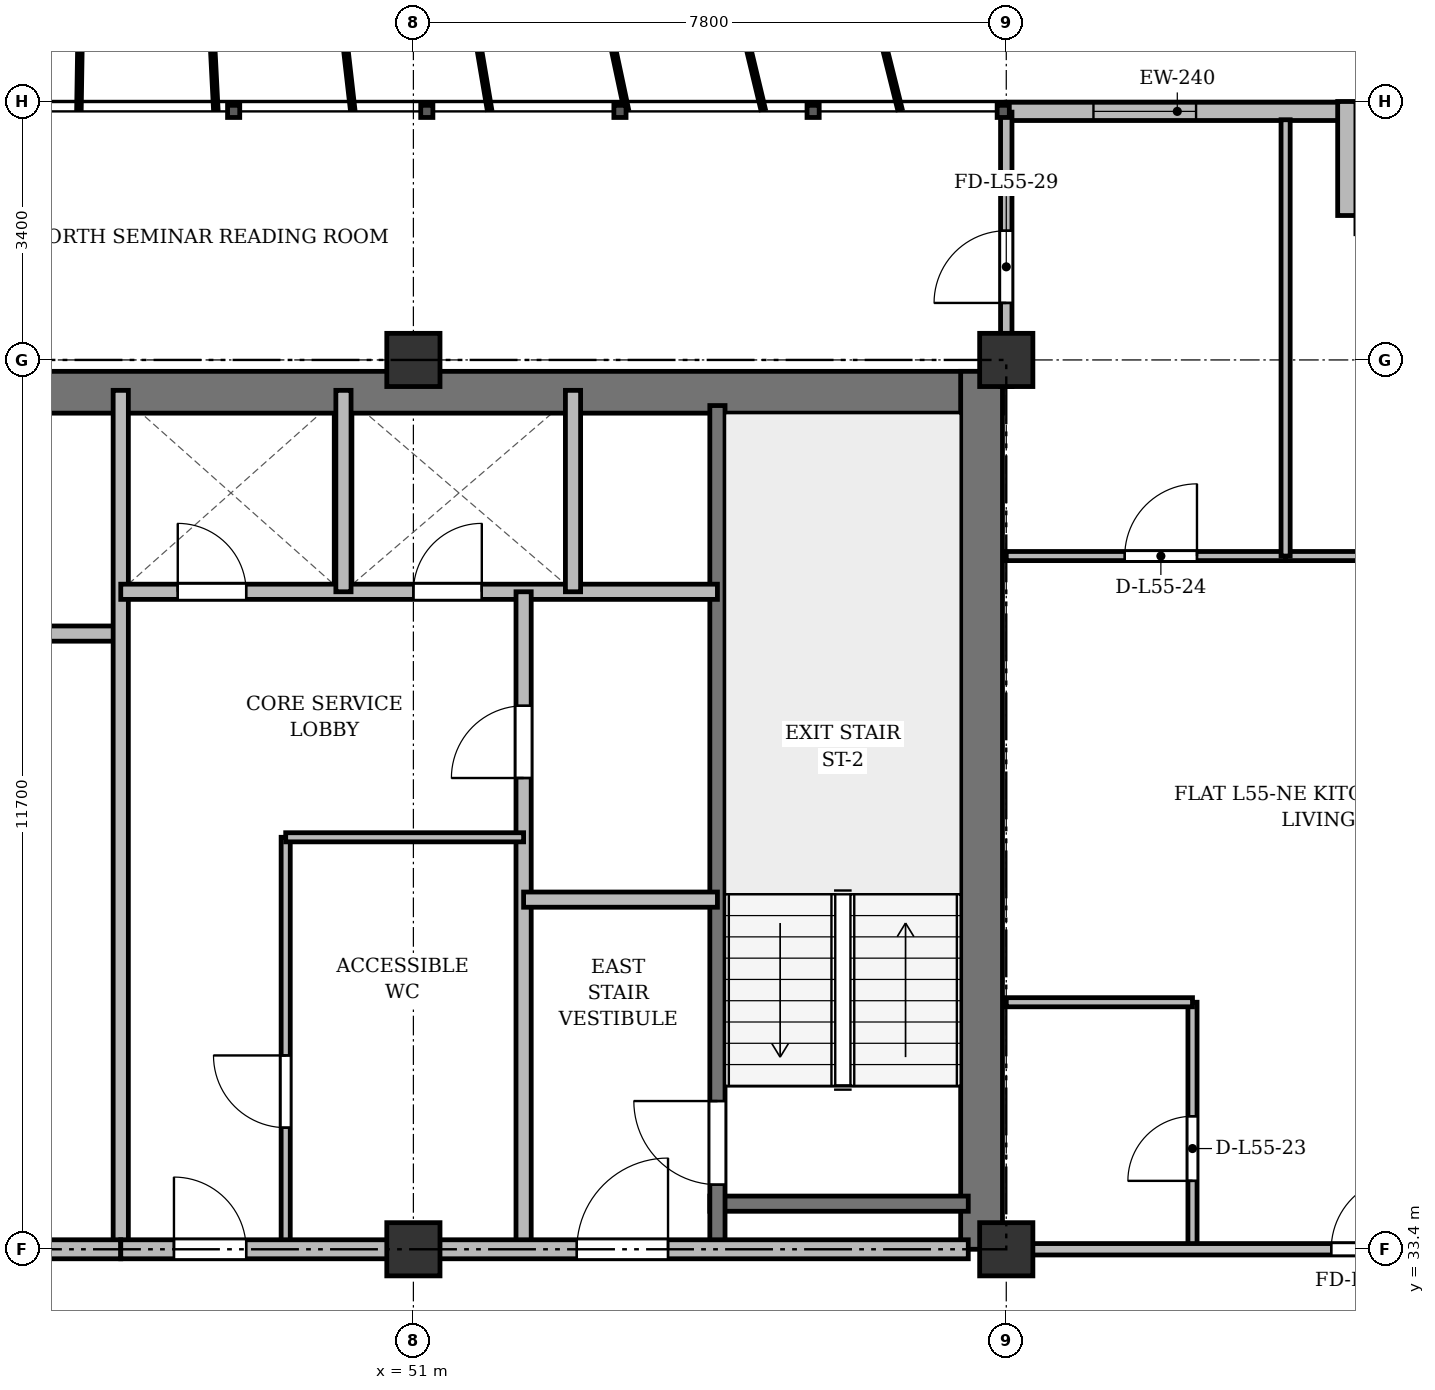
"""IFC4 building model, lengths in metres.
Left out: names, types, materials, properties, quantities, classifications, styles, units other than length and angle.
Written with IfcOpenShell. Run it as: python <this file> out.ifc"""

import sys

from ifc_helpers import new_model, si_unit, direction, frame, frame_2d, origin, origin_2d, place, context, subcontext, project, spatial, rectangle, extrude, source, transform, mapped, element, fill, save


model = new_model("IFC4")
c1 = context("Model", 3, precision=1e-05, world=origin(), true_north=direction((0.0, 1.0)))
c2 = subcontext(c1, "Body", "Model", "MODEL_VIEW")
j1 = project(units=[si_unit("LENGTHUNIT", "METRE"), si_unit("PLANEANGLEUNIT", "RADIAN")], contexts=[c1])
p1 = place(None, origin())
s1 = spatial("IfcSite", under=j1, at=p1, CompositionType="ELEMENT")
p2 = place(p1, origin())
s2 = spatial("IfcBuilding", under=s1, at=p2, CompositionType="ELEMENT")
p3 = place(p2, frame((0.0, 0.0, 212.1)))
s3 = spatial("IfcBuildingStorey", under=s2, at=p3, CompositionType="ELEMENT", Elevation=212.1)
m1 = source(origin(), c2, "Body", "SweptSolid", [
    extrude(rectangle(XDim=0.7, YDim=0.7, at=origin_2d()), origin(), (0.0, 0.0, 1.0), 3.6),
])
for number, where, z_axis, x_axis in (
    (1, (51.0, 33.4, 0.0), (0.0, 0.0, 1.0), (1.0, 0.0, 0.0)),
    (2, (51.0, 45.1, 0.0), (0.0, 0.0, 1.0), (1.0, 0.0, 0.0)),
    (3, (58.8, 33.4, 0.0), (0.0, 0.0, 1.0), (1.0, 0.0, 0.0)),
    (4, (58.8, 45.1, 0.0), (0.0, 0.0, 1.0), (1.0, 0.0, 0.0)),
):
    element("IfcColumn", number, at=place(p3, frame(where, z_axis=z_axis, x_axis=x_axis)), inside=s3, PredefinedType="COLUMN", context=c2, shape_type="MappedRepresentation", body=[
        mapped(m1, transform((0.0, 0.0, 0.0), x_axis=(1.0, 0.0, 0.0), y_axis=(0.0, 1.0, 0.0), z_axis=(0.0, 0.0, 1.0), scale=1.0)),
    ])
p4 = place(p3, frame((58.8, 48.37, 0.0), z_axis=(0.0, 0.0, 1.0), x_axis=(1.0, 0.0, 0.0)))
e5 = element("IfcWall", 5, at=p4, inside=s3, PredefinedType="SOLIDWALL", context=c2, shape_type="SweptSolid", body=[
    extrude(rectangle(XDim=4.5, YDim=0.24, at=frame_2d((2.25, 0.0))), origin(), (0.0, 0.0, 1.0), 3.36),
])
p5 = place(p4, frame((1.147, 0.0, 0.9)))
e6 = element("IfcOpeningElement", 6, at=p5, cuts=e5, PredefinedType="OPENING", context=c2, shape_type="SweptSolid", body=[
    extrude(rectangle(XDim=1.35, YDim=1.5, at=frame_2d((0.675, 0.75))), frame((0.0, 0.13, 0.0), z_axis=(0.0, -1.0, 0.0), x_axis=(1.0, 0.0, 0.0)), (0.0, 0.0, 1.0), 0.26),
])
p6 = place(p3, frame((63.28, 48.5, 0.0), z_axis=(0.0, 0.0, 1.0), x_axis=(0.0, -1.0, 0.0)))
e7 = element("IfcWall", 7, at=p6, inside=s3, PredefinedType="SOLIDWALL", context=c2, shape_type="SweptSolid", body=[
    extrude(rectangle(XDim=1.5, YDim=0.24, at=frame_2d((0.75, 0.0))), origin(), (0.0, 0.0, 1.0), 3.36),
])
p7 = place(p3, frame((15.65, 44.675, 0.0), z_axis=(0.0, 0.0, 1.0), x_axis=(1.0, 0.0, 0.0)))
e8 = element("IfcWall", 8, at=p7, inside=s3, PredefinedType="SHEAR", context=c2, shape_type="SweptSolid", body=[
    extrude(rectangle(XDim=43.1, YDim=0.55, at=frame_2d((21.55, 0.0))), origin(), (0.0, 0.0, 1.0), 3.36),
])
p8 = place(p3, frame((58.475, 33.4, 0.0), z_axis=(0.0, 0.0, 1.0), x_axis=(0.0, 1.0, 0.0)))
e9 = element("IfcWall", 9, at=p8, inside=s3, PredefinedType="SHEAR", context=c2, shape_type="SweptSolid", body=[
    extrude(rectangle(XDim=11.55, YDim=0.55, at=frame_2d((5.775, 0.0))), origin(), (0.0, 0.0, 1.0), 3.36),
])
p9 = place(p3, frame((54.9, 34.0, 0.0), z_axis=(0.0, 0.0, 1.0), x_axis=(1.0, 0.0, 0.0)))
e10 = element("IfcWall", 10, at=p9, inside=s3, PredefinedType="SHEAR", context=c2, shape_type="SweptSolid", body=[
    extrude(rectangle(XDim=3.4, YDim=0.2, at=frame_2d((1.7, 0.0))), origin(), (0.0, 0.0, 1.0), 3.36),
])
p10 = place(p3, frame((55.0, 33.4, 0.0), z_axis=(0.0, 0.0, 1.0), x_axis=(0.0, 1.0, 0.0)))
e11 = element("IfcWall", 11, at=p10, inside=s3, PredefinedType="SHEAR", context=c2, shape_type="SweptSolid", body=[
    extrude(rectangle(XDim=11.1, YDim=0.2, at=frame_2d((5.55, 0.0))), origin(), (0.0, 0.0, 1.0), 3.36),
])
p11 = place(p10, frame((0.85, 0.0, 0.0)))
e12 = element("IfcOpeningElement", 12, at=p11, cuts=e11, PredefinedType="OPENING", context=c2, shape_type="SweptSolid", body=[
    extrude(rectangle(XDim=1.1, YDim=2.15, at=frame_2d((0.55, 1.075))), frame((0.0, 0.11, 0.0), z_axis=(0.0, -1.0, 0.0), x_axis=(1.0, 0.0, 0.0)), (0.0, 0.0, 1.0), 0.22),
])
p12 = place(p3, frame((40.25, 41.5, 0.0), z_axis=(0.0, 0.0, 1.0), x_axis=(1.0, 0.0, 0.0)))
e13 = element("IfcWall", 13, at=p12, inside=s3, PredefinedType="SOLIDWALL", context=c2, shape_type="SweptSolid", body=[
    extrude(rectangle(XDim=6.9, YDim=0.2, at=frame_2d((3.45, 0.0))), origin(), (0.0, 0.0, 1.0), 3.36),
])
p13 = place(p3, frame((47.15, 33.4, 0.0), z_axis=(0.0, 0.0, 1.0), x_axis=(0.0, 1.0, 0.0)))
e14 = element("IfcWall", 14, at=p13, inside=s3, PredefinedType="SOLIDWALL", context=c2, shape_type="SweptSolid", body=[
    extrude(rectangle(XDim=11.3, YDim=0.2, at=frame_2d((5.65, 0.0))), origin(), (0.0, 0.0, 1.0), 2.91),
])
p14 = place(p3, frame((33.3, 33.4, 0.0), z_axis=(0.0, 0.0, 1.0), x_axis=(1.0, 0.0, 0.0)))
e15 = element("IfcWall", 15, at=p14, inside=s3, PredefinedType="PARTITIONING", context=c2, shape_type="SweptSolid", body=[
    extrude(rectangle(XDim=13.85, YDim=0.25, at=frame_2d((6.925, 0.0))), origin(), (0.0, 0.0, 1.0), 2.91),
])
p15 = place(p14, frame((4.2, 0.0, 0.0)))
e16 = element("IfcOpeningElement", 16, at=p15, cuts=e15, PredefinedType="OPENING", context=c2, shape_type="SweptSolid", body=[
    extrude(rectangle(XDim=1.6, YDim=2.2, at=frame_2d((0.8, 1.1))), frame((0.0, 0.135, 0.0), z_axis=(0.0, -1.0, 0.0), x_axis=(1.0, 0.0, 0.0)), (0.0, 0.0, 1.0), 0.27),
])
p16 = place(p3, frame((47.15, 42.05, 0.0), z_axis=(0.0, 0.0, 1.0), x_axis=(1.0, 0.0, 0.0)))
e17 = element("IfcWall", 17, at=p16, inside=s3, PredefinedType="SOLIDWALL", context=c2, shape_type="SweptSolid", body=[
    extrude(rectangle(XDim=7.85, YDim=0.2, at=frame_2d((3.925, 0.0))), origin(), (0.0, 0.0, 1.0), 2.86),
])
p17 = place(p16, frame((0.75, 0.0, 0.0)))
e18 = element("IfcOpeningElement", 18, at=p17, cuts=e17, PredefinedType="OPENING", context=c2, shape_type="SweptSolid", body=[
    extrude(rectangle(XDim=0.9, YDim=2.1, at=frame_2d((0.45, 1.05))), frame((0.0, 0.11, 0.0), z_axis=(0.0, -1.0, 0.0), x_axis=(1.0, 0.0, 0.0)), (0.0, 0.0, 1.0), 0.22),
])
p18 = place(p16, frame((3.85, 0.0, 0.0)))
e19 = element("IfcOpeningElement", 19, at=p18, cuts=e17, PredefinedType="OPENING", context=c2, shape_type="SweptSolid", body=[
    extrude(rectangle(XDim=0.9, YDim=2.1, at=frame_2d((0.45, 1.05))), frame((0.0, 0.11, 0.0), z_axis=(0.0, -1.0, 0.0), x_axis=(1.0, 0.0, 0.0)), (0.0, 0.0, 1.0), 0.22),
])
for number, where, z_axis, x_axis in (
    (20, (50.08, 42.05, 0.0), (0.0, 0.0, 1.0), (0.0, 1.0, 0.0)),
    (21, (53.1, 42.05, 0.0), (0.0, 0.0, 1.0), (0.0, 1.0, 0.0)),
):
    element("IfcWall", number, at=place(p3, frame(where, z_axis=z_axis, x_axis=x_axis)), inside=s3, PredefinedType="SOLIDWALL", context=c2, shape_type="SweptSolid", body=[
        extrude(rectangle(XDim=2.65, YDim=0.2, at=frame_2d((1.325, 0.0))), origin(), (0.0, 0.0, 1.0), 3.36),
    ])
p19 = place(p3, frame((52.45, 33.4, 0.0), z_axis=(0.0, 0.0, 1.0), x_axis=(0.0, 1.0, 0.0)))
e22 = element("IfcWall", 22, at=p19, inside=s3, PredefinedType="PARTITIONING", context=c2, shape_type="SweptSolid", body=[
    extrude(rectangle(XDim=8.65, YDim=0.2, at=frame_2d((4.325, 0.0))), origin(), (0.0, 0.0, 1.0), 2.91),
])
p20 = place(p19, frame((6.2, 0.0, 0.0)))
e23 = element("IfcOpeningElement", 23, at=p20, cuts=e22, PredefinedType="OPENING", context=c2, shape_type="SweptSolid", body=[
    extrude(rectangle(XDim=0.95, YDim=2.15, at=frame_2d((0.475, 1.075))), frame((0.0, 0.11, 0.0), z_axis=(0.0, -1.0, 0.0), x_axis=(1.0, 0.0, 0.0)), (0.0, 0.0, 1.0), 0.22),
])
p21 = place(p3, frame((52.45, 38.0, 0.0), z_axis=(0.0, 0.0, 1.0), x_axis=(1.0, 0.0, 0.0)))
e24 = element("IfcWall", 24, at=p21, inside=s3, PredefinedType="PARTITIONING", context=c2, shape_type="SweptSolid", body=[
    extrude(rectangle(XDim=2.55, YDim=0.2, at=frame_2d((1.275, 0.0))), origin(), (0.0, 0.0, 1.0), 3.36),
])
p22 = place(p3, frame((49.32, 33.4, 0.0), z_axis=(0.0, 0.0, 1.0), x_axis=(0.0, 1.0, 0.0)))
e25 = element("IfcWall", 25, at=p22, inside=s3, PredefinedType="PARTITIONING", context=c2, shape_type="SweptSolid", body=[
    extrude(rectangle(XDim=5.42, YDim=0.12, at=frame_2d((2.71, 0.0))), origin(), (0.0, 0.0, 1.0), 2.91),
])
p23 = place(p22, frame((1.6, 0.0, 0.0)))
e26 = element("IfcOpeningElement", 26, at=p23, cuts=e25, PredefinedType="OPENING", context=c2, shape_type="SweptSolid", body=[
    extrude(rectangle(XDim=0.95, YDim=2.15, at=frame_2d((0.475, 1.075))), frame((0.0, 0.07, 0.0), z_axis=(0.0, -1.0, 0.0), x_axis=(1.0, 0.0, 0.0)), (0.0, 0.0, 1.0), 0.14),
])
p24 = place(p3, frame((49.32, 38.82, 0.0), z_axis=(0.0, 0.0, 1.0), x_axis=(1.0, 0.0, 0.0)))
e27 = element("IfcWall", 27, at=p24, inside=s3, PredefinedType="PARTITIONING", context=c2, shape_type="SweptSolid", body=[
    extrude(rectangle(XDim=3.13, YDim=0.12, at=frame_2d((1.565, 0.0))), origin(), (0.0, 0.0, 1.0), 2.86),
])
p25 = place(p3, frame((47.15, 33.4, 0.0), z_axis=(0.0, 0.0, 1.0), x_axis=(1.0, 0.0, 0.0)))
e28 = element("IfcWall", 28, at=p25, inside=s3, PredefinedType="PARTITIONING", context=c2, shape_type="SweptSolid", body=[
    extrude(rectangle(XDim=11.15, YDim=0.25, at=frame_2d((5.575, 0.0))), origin(), (0.0, 0.0, 1.0), 2.91),
])
p26 = place(p25, frame((0.7, 0.0, 0.0)))
e29 = element("IfcOpeningElement", 29, at=p26, cuts=e28, PredefinedType="OPENING", context=c2, shape_type="SweptSolid", body=[
    extrude(rectangle(XDim=0.95, YDim=2.15, at=frame_2d((0.475, 1.075))), frame((0.0, 0.135, 0.0), z_axis=(0.0, -1.0, 0.0), x_axis=(1.0, 0.0, 0.0)), (0.0, 0.0, 1.0), 0.27),
])
p27 = place(p25, frame((6.0, 0.0, 0.0)))
e30 = element("IfcOpeningElement", 30, at=p27, cuts=e28, PredefinedType="OPENING", context=c2, shape_type="SweptSolid", body=[
    extrude(rectangle(XDim=1.2, YDim=2.15, at=frame_2d((0.6, 1.075))), frame((0.0, 0.135, 0.0), z_axis=(0.0, -1.0, 0.0), x_axis=(1.0, 0.0, 0.0)), (0.0, 0.0, 1.0), 0.27),
])
p28 = place(p3, frame((61.25, 33.4, 0.0), z_axis=(0.0, 0.0, 1.0), x_axis=(0.0, 1.0, 0.0)))
e31 = element("IfcWall", 31, at=p28, inside=s3, PredefinedType="PARTITIONING", context=c2, shape_type="SweptSolid", body=[
    extrude(rectangle(XDim=3.25, YDim=0.12, at=frame_2d((1.625, 0.0))), origin(), (0.0, 0.0, 1.0), 2.91),
])
p29 = place(p28, frame((0.9, 0.0, 0.0)))
e32 = element("IfcOpeningElement", 32, at=p29, cuts=e31, PredefinedType="OPENING", context=c2, shape_type="SweptSolid", body=[
    extrude(rectangle(XDim=0.85, YDim=2.1, at=frame_2d((0.425, 1.05))), frame((0.0, 0.07, 0.0), z_axis=(0.0, -1.0, 0.0), x_axis=(1.0, 0.0, 0.0)), (0.0, 0.0, 1.0), 0.14),
])
p30 = place(p3, frame((58.8, 36.65, 0.0), z_axis=(0.0, 0.0, 1.0), x_axis=(1.0, 0.0, 0.0)))
e33 = element("IfcWall", 33, at=p30, inside=s3, PredefinedType="PARTITIONING", context=c2, shape_type="SweptSolid", body=[
    extrude(rectangle(XDim=2.45, YDim=0.12, at=frame_2d((1.225, 0.0))), origin(), (0.0, 0.0, 1.0), 2.86),
])
p31 = place(p3, frame((58.8, 42.52, 0.0), z_axis=(0.0, 0.0, 1.0), x_axis=(1.0, 0.0, 0.0)))
e34 = element("IfcWall", 34, at=p31, inside=s3, PredefinedType="PARTITIONING", context=c2, shape_type="SweptSolid", body=[
    extrude(rectangle(XDim=3.675, YDim=0.12, at=frame_2d((1.837, 0.0))), origin(), (0.0, 0.0, 1.0), 2.86),
])
p32 = place(p31, frame((1.559, 0.0, 0.0)))
e35 = element("IfcOpeningElement", 35, at=p32, cuts=e34, PredefinedType="OPENING", context=c2, shape_type="SweptSolid", body=[
    extrude(rectangle(XDim=0.95, YDim=2.15, at=frame_2d((0.475, 1.075))), frame((0.0, 0.07, 0.0), z_axis=(0.0, -1.0, 0.0), x_axis=(1.0, 0.0, 0.0)), (0.0, 0.0, 1.0), 0.14),
])
p33 = place(p3, frame((62.475, 42.52, 0.0), z_axis=(0.0, 0.0, 1.0), x_axis=(1.0, 0.0, 0.0)))
e36 = element("IfcWall", 36, at=p33, inside=s3, PredefinedType="PARTITIONING", context=c2, shape_type="SweptSolid", body=[
    extrude(rectangle(XDim=3.675, YDim=0.12, at=frame_2d((1.837, 0.0))), origin(), (0.0, 0.0, 1.0), 2.86),
])
p34 = place(p33, frame((1.166, 0.0, 0.0)))
e37 = element("IfcOpeningElement", 37, at=p34, cuts=e36, PredefinedType="OPENING", context=c2, shape_type="SweptSolid", body=[
    extrude(rectangle(XDim=0.95, YDim=2.15, at=frame_2d((0.475, 1.075))), frame((0.0, 0.07, 0.0), z_axis=(0.0, -1.0, 0.0), x_axis=(1.0, 0.0, 0.0)), (0.0, 0.0, 1.0), 0.14),
])
p35 = place(p3, frame((62.475, 42.52, 0.0), z_axis=(0.0, 0.0, 1.0), x_axis=(0.0, 1.0, 0.0)))
e38 = element("IfcWall", 38, at=p35, inside=s3, PredefinedType="PARTITIONING", context=c2, shape_type="SweptSolid", body=[
    extrude(rectangle(XDim=5.74, YDim=0.12, at=frame_2d((2.87, 0.0))), origin(), (0.0, 0.0, 1.0), 2.91),
])
p36 = place(p3, frame((58.8, 33.4, 0.0), z_axis=(0.0, 0.0, 1.0), x_axis=(1.0, 0.0, 0.0)))
e39 = element("IfcWall", 39, at=p36, inside=s3, PredefinedType="PARTITIONING", context=c2, shape_type="SweptSolid", body=[
    extrude(rectangle(XDim=7.35, YDim=0.15, at=frame_2d((3.675, 0.0))), origin(), (0.0, 0.0, 1.0), 2.91),
])
p37 = place(p36, frame((4.275, 0.0, 0.0)))
e40 = element("IfcOpeningElement", 40, at=p37, cuts=e39, PredefinedType="OPENING", context=c2, shape_type="SweptSolid", body=[
    extrude(rectangle(XDim=0.95, YDim=2.15, at=frame_2d((0.475, 1.075))), frame((0.0, 0.085, 0.0), z_axis=(0.0, -1.0, 0.0), x_axis=(1.0, 0.0, 0.0)), (0.0, 0.0, 1.0), 0.17),
])
p38 = place(p3, frame((58.8, 44.75, 0.0), z_axis=(0.0, 0.0, 1.0), x_axis=(0.0, 1.0, 0.0)))
e41 = element("IfcWall", 41, at=p38, inside=s3, PredefinedType="PARTITIONING", context=c2, shape_type="SweptSolid", body=[
    extrude(rectangle(XDim=3.61, YDim=0.15, at=frame_2d((1.805, 0.0))), origin(), (0.0, 0.0, 1.0), 2.86),
])
p39 = place(p38, frame((1.1, 0.0, 0.0)))
e42 = element("IfcOpeningElement", 42, at=p39, cuts=e41, PredefinedType="OPENING", context=c2, shape_type="SweptSolid", body=[
    extrude(rectangle(XDim=0.95, YDim=2.15, at=frame_2d((0.475, 1.075))), frame((0.0, 0.085, 0.0), z_axis=(0.0, -1.0, 0.0), x_axis=(1.0, 0.0, 0.0)), (0.0, 0.0, 1.0), 0.17),
])
m2 = source(origin(), c2, "Body", "SweptSolid", [
    extrude(rectangle(XDim=1.35, YDim=1.5, at=frame_2d((0.675, 0.75))), frame((0.0, 0.03, 0.0), z_axis=(0.0, -1.0, 0.0), x_axis=(1.0, 0.0, 0.0)), (0.0, 0.0, 1.0), 0.06),
])
p40 = place(p5, origin())
e43 = element("IfcWindow", 43, at=p40, inside=s3, PartitioningType="SINGLE_PANEL", PredefinedType="WINDOW", context=c2, shape_type="MappedRepresentation", body=[
    mapped(m2, transform((0.0, 0.0, 0.0), x_axis=(1.0, 0.0, 0.0), y_axis=(0.0, 1.0, 0.0), z_axis=(0.0, 0.0, 1.0), scale=1.0)),
])
fill(e6, e43)
m3 = source(origin(), c2, "Body", "SweptSolid", [
    extrude(rectangle(XDim=1.1, YDim=2.15, at=frame_2d((0.55, 1.075))), frame((0.0, 0.025, 0.0), z_axis=(0.0, -1.0, 0.0), x_axis=(1.0, 0.0, 0.0)), (0.0, 0.0, 1.0), 0.05),
])
p41 = place(p11, origin())
e44 = element("IfcDoor", 44, at=p41, inside=s3, OperationType="SINGLE_SWING_RIGHT", PredefinedType="DOOR", context=c2, shape_type="MappedRepresentation", body=[
    mapped(m3, transform((0.0, 0.0, 0.0), x_axis=(1.0, 0.0, 0.0), y_axis=(0.0, 1.0, 0.0), z_axis=(0.0, 0.0, 1.0), scale=1.0)),
])
fill(e12, e44)
m4 = source(origin(), c2, "Body", "SweptSolid", [
    extrude(rectangle(XDim=0.9, YDim=2.1, at=frame_2d((0.45, 1.05))), frame((0.0, 0.025, 0.0), z_axis=(0.0, -1.0, 0.0), x_axis=(1.0, 0.0, 0.0)), (0.0, 0.0, 1.0), 0.05),
])
p42 = place(p17, origin())
e45 = element("IfcDoor", 45, at=p42, inside=s3, OperationType="SINGLE_SWING_LEFT", PredefinedType="DOOR", context=c2, shape_type="MappedRepresentation", body=[
    mapped(m4, transform((0.0, 0.0, 0.0), x_axis=(1.0, 0.0, 0.0), y_axis=(0.0, 1.0, 0.0), z_axis=(0.0, 0.0, 1.0), scale=1.0)),
])
fill(e18, e45)
p43 = place(p18, origin())
e46 = element("IfcDoor", 46, at=p43, inside=s3, OperationType="SINGLE_SWING_RIGHT", PredefinedType="DOOR", context=c2, shape_type="MappedRepresentation", body=[
    mapped(m4, transform((0.0, 0.0, 0.0), x_axis=(1.0, 0.0, 0.0), y_axis=(0.0, 1.0, 0.0), z_axis=(0.0, 0.0, 1.0), scale=1.0)),
])
fill(e19, e46)
m5 = source(origin(), c2, "Body", "SweptSolid", [
    extrude(rectangle(XDim=0.95, YDim=2.15, at=frame_2d((0.475, 1.075))), frame((0.0, 0.025, 0.0), z_axis=(0.0, -1.0, 0.0), x_axis=(1.0, 0.0, 0.0)), (0.0, 0.0, 1.0), 0.05),
])
p44 = place(p20, origin())
e47 = element("IfcDoor", 47, at=p44, inside=s3, OperationType="SINGLE_SWING_LEFT", PredefinedType="DOOR", context=c2, shape_type="MappedRepresentation", body=[
    mapped(m5, transform((0.0, 0.0, 0.0), x_axis=(1.0, 0.0, 0.0), y_axis=(0.0, 1.0, 0.0), z_axis=(0.0, 0.0, 1.0), scale=1.0)),
])
fill(e23, e47)
p45 = place(p23, origin())
e48 = element("IfcDoor", 48, at=p45, inside=s3, OperationType="SINGLE_SWING_RIGHT", PredefinedType="DOOR", context=c2, shape_type="MappedRepresentation", body=[
    mapped(m5, transform((0.0, 0.0, 0.0), x_axis=(1.0, 0.0, 0.0), y_axis=(0.0, 1.0, 0.0), z_axis=(0.0, 0.0, 1.0), scale=1.0)),
])
fill(e26, e48)
p46 = place(p26, origin())
e49 = element("IfcDoor", 49, at=p46, inside=s3, OperationType="SINGLE_SWING_LEFT", PredefinedType="DOOR", context=c2, shape_type="MappedRepresentation", body=[
    mapped(m5, transform((0.0, 0.0, 0.0), x_axis=(1.0, 0.0, 0.0), y_axis=(0.0, 1.0, 0.0), z_axis=(0.0, 0.0, 1.0), scale=1.0)),
])
fill(e29, e49)
m6 = source(origin(), c2, "Body", "SweptSolid", [
    extrude(rectangle(XDim=1.2, YDim=2.15, at=frame_2d((0.6, 1.075))), frame((0.0, 0.025, 0.0), z_axis=(0.0, -1.0, 0.0), x_axis=(1.0, 0.0, 0.0)), (0.0, 0.0, 1.0), 0.05),
])
p47 = place(p27, origin())
e50 = element("IfcDoor", 50, at=p47, inside=s3, OperationType="SINGLE_SWING_RIGHT", PredefinedType="DOOR", context=c2, shape_type="MappedRepresentation", body=[
    mapped(m6, transform((0.0, 0.0, 0.0), x_axis=(1.0, 0.0, 0.0), y_axis=(0.0, 1.0, 0.0), z_axis=(0.0, 0.0, 1.0), scale=1.0)),
])
fill(e30, e50)
m7 = source(origin(), c2, "Body", "SweptSolid", [
    extrude(rectangle(XDim=0.85, YDim=2.1, at=frame_2d((0.425, 1.05))), frame((0.0, 0.025, 0.0), z_axis=(0.0, -1.0, 0.0), x_axis=(1.0, 0.0, 0.0)), (0.0, 0.0, 1.0), 0.05),
])
p48 = place(p29, origin())
e51 = element("IfcDoor", 51, at=p48, inside=s3, OperationType="SINGLE_SWING_LEFT", PredefinedType="DOOR", context=c2, shape_type="MappedRepresentation", body=[
    mapped(m7, transform((0.0, 0.0, 0.0), x_axis=(1.0, 0.0, 0.0), y_axis=(0.0, 1.0, 0.0), z_axis=(0.0, 0.0, 1.0), scale=1.0)),
])
fill(e32, e51)
p49 = place(p32, origin())
e52 = element("IfcDoor", 52, at=p49, inside=s3, OperationType="SINGLE_SWING_RIGHT", PredefinedType="DOOR", context=c2, shape_type="MappedRepresentation", body=[
    mapped(m5, transform((0.0, 0.0, 0.0), x_axis=(1.0, 0.0, 0.0), y_axis=(0.0, 1.0, 0.0), z_axis=(0.0, 0.0, 1.0), scale=1.0)),
])
fill(e35, e52)
p50 = place(p37, origin())
e53 = element("IfcDoor", 53, at=p50, inside=s3, OperationType="SINGLE_SWING_RIGHT", PredefinedType="DOOR", context=c2, shape_type="MappedRepresentation", body=[
    mapped(m5, transform((0.0, 0.0, 0.0), x_axis=(1.0, 0.0, 0.0), y_axis=(0.0, 1.0, 0.0), z_axis=(0.0, 0.0, 1.0), scale=1.0)),
])
fill(e40, e53)
p51 = place(p39, origin())
e54 = element("IfcDoor", 54, at=p51, inside=s3, OperationType="SINGLE_SWING_LEFT", PredefinedType="DOOR", context=c2, shape_type="MappedRepresentation", body=[
    mapped(m5, transform((0.0, 0.0, 0.0), x_axis=(1.0, 0.0, 0.0), y_axis=(0.0, 1.0, 0.0), z_axis=(0.0, 0.0, 1.0), scale=1.0)),
])
fill(e42, e54)
save(model, sys.argv[1])
